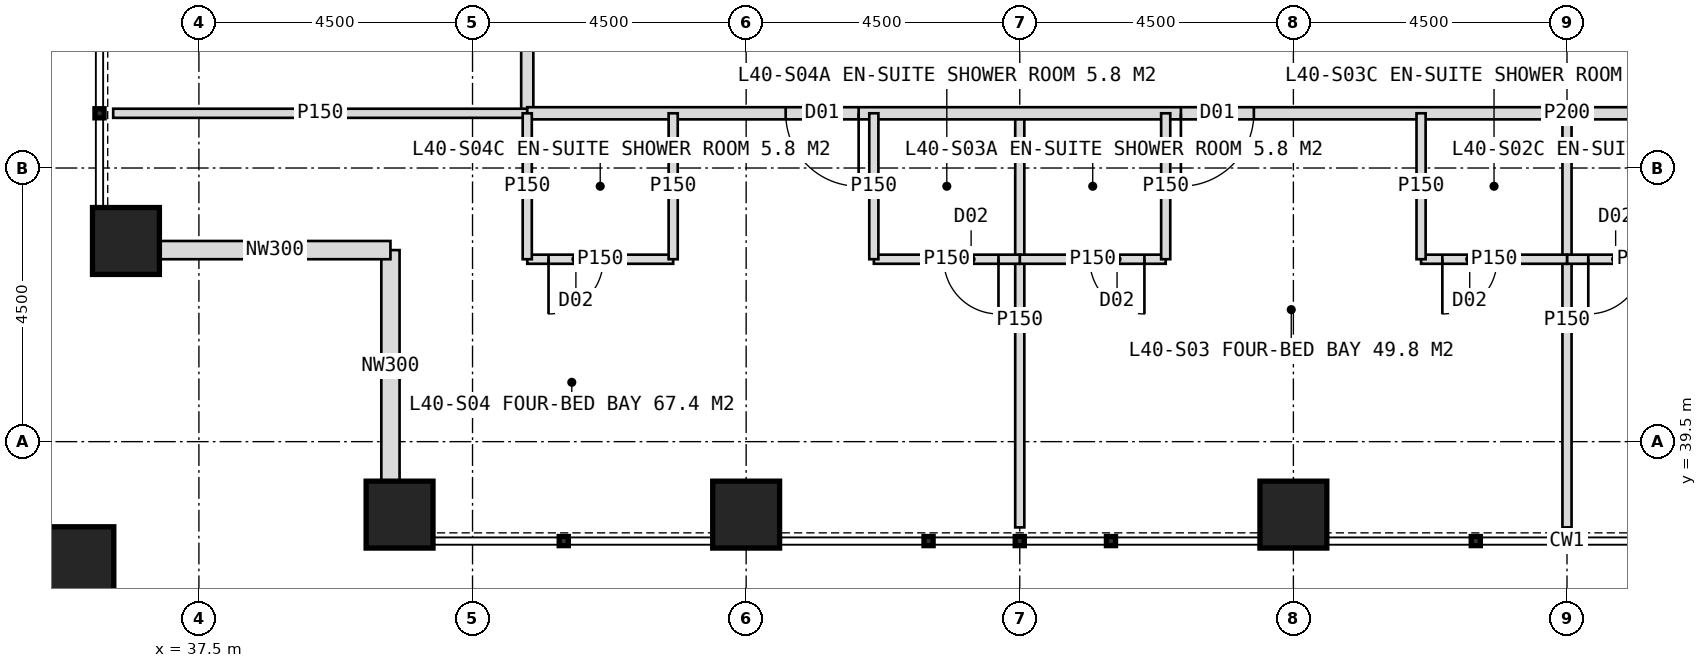
"""IFC4 building model, lengths in metres.
Left out: names, types, materials, properties, quantities, classifications, styles, units other than length and angle.
Written with IfcOpenShell. Run it as: python <this file> out.ifc"""

import sys

from ifc_helpers import new_model, si_unit, direction, frame, frame_2d, origin, origin_2d, place, context, subcontext, project, spatial, rectangle, hollow_rectangle, extrude, element, fill, save


model = new_model("IFC4")
c1 = context("Model", 3, precision=1e-05, world=origin(), true_north=direction((0.0, 1.0)))
c2 = subcontext(c1, "Body", "Model", "MODEL_VIEW")
j1 = project(units=[si_unit("LENGTHUNIT", "METRE"), si_unit("PLANEANGLEUNIT", "RADIAN")], contexts=[c1])
p1 = place(None, origin())
s1 = spatial("IfcSite", under=j1, at=p1, CompositionType="ELEMENT")
p2 = place(p1, origin())
s2 = spatial("IfcBuilding", under=s1, at=p2, CompositionType="ELEMENT")
p3 = place(p2, frame((0.0, 0.0, 168.0)))
s3 = spatial("IfcBuildingStorey", under=s2, at=p3, CompositionType="ELEMENT", Elevation=168.0)
for number, where, z_axis, x_axis in (
    (1, (40.8, 38.3, 0.0), (0.0, 0.0, 1.0), (1.0, 0.0, 0.0)),
    (2, (36.3, 42.8, 0.0), (0.0, 0.0, 1.0), (1.0, 0.0, 0.0)),
    (3, (46.5, 38.3, 0.0), (0.0, 0.0, 1.0), (1.0, 0.0, 0.0)),
    (4, (55.5, 38.3, 0.0), (0.0, 0.0, 1.0), (1.0, 0.0, 0.0)),
):
    element("IfcColumn", number, at=place(p3, frame(where, z_axis=z_axis, x_axis=x_axis)), inside=s3, PredefinedType="COLUMN", context=c2, shape_type="SweptSolid", body=[
        extrude(hollow_rectangle(XDim=1.1, YDim=1.1, WallThickness=0.1, at=origin_2d()), origin(), (0.0, 0.0, 1.0), 4.0),
    ])
p4 = place(p3, frame((35.4, 37.4, 0.0), z_axis=(0.0, 0.0, 1.0), x_axis=(1.0, 0.0, 0.0)))
e5 = element("IfcColumn", 5, at=p4, inside=s3, PredefinedType="COLUMN", context=c2, shape_type="SweptSolid", body=[
    extrude(hollow_rectangle(XDim=1.4, YDim=1.4, WallThickness=0.08, at=origin_2d()), origin(), (0.0, 0.0, 1.0), 2.0),
])
for number, where, z_axis, x_axis in (
    (6, (40.65, 38.85, 0.0), (0.0, 0.0, 1.0), (0.0, 1.0, 0.0)),
    (7, (40.65, 42.65, 0.0), (0.0, 0.0, 1.0), (-1.0, 0.0, 0.0)),
):
    element("IfcWall", number, at=place(p3, frame(where, z_axis=z_axis, x_axis=x_axis)), inside=s3, PredefinedType="ELEMENTEDWALL", context=c2, shape_type="SweptSolid", body=[
        extrude(rectangle(XDim=3.8, YDim=0.3, at=frame_2d((1.9, 0.0))), origin(), (0.0, 0.0, 1.0), 4.0),
    ])
p5 = place(p3, frame((42.9, 44.9, 0.0), z_axis=(0.0, 0.0, 1.0), x_axis=(0.0, 1.0, 0.0)))
e8 = element("IfcWall", 8, at=p5, inside=s3, PredefinedType="PARTITIONING", context=c2, shape_type="SweptSolid", body=[
    extrude(rectangle(XDim=34.2, YDim=0.2, at=frame_2d((17.1, 0.0))), origin(), (0.0, 0.0, 1.0), 3.75),
])
p6 = place(p5, frame((2.15, 0.0, 0.0)))
e9 = element("IfcOpeningElement", 9, at=p6, cuts=e8, PredefinedType="OPENING", context=c2, shape_type="SweptSolid", body=[
    extrude(rectangle(XDim=1.2, YDim=2.2, at=frame_2d((0.6, 1.1))), frame((0.0, 0.11, 0.0), z_axis=(0.0, -1.0, 0.0), x_axis=(1.0, 0.0, 0.0)), (0.0, 0.0, 1.0), 0.22),
])
p7 = place(p5, frame((9.25, 0.0, 0.0)))
e10 = element("IfcOpeningElement", 10, at=p7, cuts=e8, PredefinedType="OPENING", context=c2, shape_type="SweptSolid", body=[
    extrude(rectangle(XDim=1.2, YDim=2.2, at=frame_2d((0.6, 1.1))), frame((0.0, 0.11, 0.0), z_axis=(0.0, -1.0, 0.0), x_axis=(1.0, 0.0, 0.0)), (0.0, 0.0, 1.0), 0.22),
])
p8 = place(p5, frame((13.25, 0.0, 0.0)))
e11 = element("IfcOpeningElement", 11, at=p8, cuts=e8, PredefinedType="OPENING", context=c2, shape_type="SweptSolid", body=[
    extrude(rectangle(XDim=1.2, YDim=2.2, at=frame_2d((0.6, 1.1))), frame((0.0, 0.11, 0.0), z_axis=(0.0, -1.0, 0.0), x_axis=(1.0, 0.0, 0.0)), (0.0, 0.0, 1.0), 0.22),
])
p9 = place(p5, frame((19.75, 0.0, 0.0)))
e12 = element("IfcOpeningElement", 12, at=p9, cuts=e8, PredefinedType="OPENING", context=c2, shape_type="SweptSolid", body=[
    extrude(rectangle(XDim=1.2, YDim=2.2, at=frame_2d((0.6, 1.1))), frame((0.0, 0.11, 0.0), z_axis=(0.0, -1.0, 0.0), x_axis=(1.0, 0.0, 0.0)), (0.0, 0.0, 1.0), 0.22),
])
p10 = place(p5, frame((30.35, 0.0, 0.0)))
e13 = element("IfcOpeningElement", 13, at=p10, cuts=e8, PredefinedType="OPENING", context=c2, shape_type="SweptSolid", body=[
    extrude(rectangle(XDim=1.2, YDim=2.2, at=frame_2d((0.6, 1.1))), frame((0.0, 0.11, 0.0), z_axis=(0.0, -1.0, 0.0), x_axis=(1.0, 0.0, 0.0)), (0.0, 0.0, 1.0), 0.22),
])
p11 = place(p3, frame((42.9, 44.9, 0.0), z_axis=(0.0, 0.0, 1.0), x_axis=(-1.0, 0.0, 0.0)))
e14 = element("IfcWall", 14, at=p11, inside=s3, PredefinedType="PARTITIONING", context=c2, shape_type="SweptSolid", body=[
    extrude(rectangle(XDim=6.81, YDim=0.15, at=frame_2d((3.405, 0.0))), origin(), (0.0, 0.0, 1.0), 3.75),
])
p12 = place(p3, frame((60.0, 44.9, 0.0), z_axis=(0.0, 0.0, 1.0), x_axis=(0.0, -1.0, 0.0)))
e15 = element("IfcWall", 15, at=p12, inside=s3, PredefinedType="PARTITIONING", context=c2, shape_type="SweptSolid", body=[
    extrude(rectangle(XDim=6.81, YDim=0.15, at=frame_2d((3.405, 0.0))), origin(), (0.0, 0.0, 1.0), 2.95),
])
p13 = place(p3, frame((51.0, 44.9, 0.0), z_axis=(0.0, 0.0, 1.0), x_axis=(0.0, -1.0, 0.0)))
e16 = element("IfcWall", 16, at=p13, inside=s3, PredefinedType="PARTITIONING", context=c2, shape_type="SweptSolid", body=[
    extrude(rectangle(XDim=6.81, YDim=0.15, at=frame_2d((3.405, 0.0))), origin(), (0.0, 0.0, 1.0), 3.75),
])
p14 = place(p3, frame((77.1, 44.9, 0.0), z_axis=(0.0, 0.0, 1.0), x_axis=(-1.0, 0.0, 0.0)))
e17 = element("IfcWall", 17, at=p14, inside=s3, PredefinedType="PARTITIONING", context=c2, shape_type="SweptSolid", body=[
    extrude(rectangle(XDim=34.2, YDim=0.2, at=frame_2d((17.1, 0.0))), origin(), (0.0, 0.0, 1.0), 3.75),
])
p15 = place(p14, frame((4.25, 0.0, 0.0)))
e18 = element("IfcOpeningElement", 18, at=p15, cuts=e17, PredefinedType="OPENING", context=c2, shape_type="SweptSolid", body=[
    extrude(rectangle(XDim=1.2, YDim=2.2, at=frame_2d((0.6, 1.1))), frame((0.0, 0.11, 0.0), z_axis=(0.0, -1.0, 0.0), x_axis=(1.0, 0.0, 0.0)), (0.0, 0.0, 1.0), 0.22),
])
p16 = place(p14, frame((10.75, 0.0, 0.0)))
e19 = element("IfcOpeningElement", 19, at=p16, cuts=e17, PredefinedType="OPENING", context=c2, shape_type="SweptSolid", body=[
    extrude(rectangle(XDim=1.2, YDim=2.2, at=frame_2d((0.6, 1.1))), frame((0.0, 0.11, 0.0), z_axis=(0.0, -1.0, 0.0), x_axis=(1.0, 0.0, 0.0)), (0.0, 0.0, 1.0), 0.22),
])
p17 = place(p14, frame((22.25, 0.0, 0.0)))
e20 = element("IfcOpeningElement", 20, at=p17, cuts=e17, PredefinedType="OPENING", context=c2, shape_type="SweptSolid", body=[
    extrude(rectangle(XDim=1.2, YDim=2.2, at=frame_2d((0.6, 1.1))), frame((0.0, 0.11, 0.0), z_axis=(0.0, -1.0, 0.0), x_axis=(1.0, 0.0, 0.0)), (0.0, 0.0, 1.0), 0.22),
])
p18 = place(p14, frame((28.75, 0.0, 0.0)))
e21 = element("IfcOpeningElement", 21, at=p18, cuts=e17, PredefinedType="OPENING", context=c2, shape_type="SweptSolid", body=[
    extrude(rectangle(XDim=1.2, YDim=2.2, at=frame_2d((0.6, 1.1))), frame((0.0, 0.11, 0.0), z_axis=(0.0, -1.0, 0.0), x_axis=(1.0, 0.0, 0.0)), (0.0, 0.0, 1.0), 0.22),
])
p19 = place(p3, frame((62.4, 42.5, 0.0), z_axis=(0.0, 0.0, 1.0), x_axis=(-1.0, 0.0, 0.0)))
e22 = element("IfcWall", 22, at=p19, inside=s3, PredefinedType="PARTITIONING", context=c2, shape_type="SweptSolid", body=[
    extrude(rectangle(XDim=2.4, YDim=0.15, at=frame_2d((1.2, 0.0))), origin(), (0.0, 0.0, 1.0), 3.75),
])
p20 = place(p19, frame((1.15, 0.0, 0.0)))
e23 = element("IfcOpeningElement", 23, at=p20, cuts=e22, PredefinedType="OPENING", context=c2, shape_type="SweptSolid", body=[
    extrude(rectangle(XDim=0.9, YDim=2.1, at=frame_2d((0.45, 1.05))), frame((0.0, 0.085, 0.0), z_axis=(0.0, -1.0, 0.0), x_axis=(1.0, 0.0, 0.0)), (0.0, 0.0, 1.0), 0.17),
])
p21 = place(p3, frame((53.4, 42.5, 0.0), z_axis=(0.0, 0.0, 1.0), x_axis=(-1.0, 0.0, 0.0)))
e24 = element("IfcWall", 24, at=p21, inside=s3, PredefinedType="PARTITIONING", context=c2, shape_type="SweptSolid", body=[
    extrude(rectangle(XDim=2.4, YDim=0.15, at=frame_2d((1.2, 0.0))), origin(), (0.0, 0.0, 1.0), 3.75),
])
p22 = place(p21, frame((0.35, 0.0, 0.0)))
e25 = element("IfcOpeningElement", 25, at=p22, cuts=e24, PredefinedType="OPENING", context=c2, shape_type="SweptSolid", body=[
    extrude(rectangle(XDim=0.9, YDim=2.1, at=frame_2d((0.45, 1.05))), frame((0.0, 0.085, 0.0), z_axis=(0.0, -1.0, 0.0), x_axis=(1.0, 0.0, 0.0)), (0.0, 0.0, 1.0), 0.17),
])
p23 = place(p3, frame((53.4, 44.9, 0.0), z_axis=(0.0, 0.0, 1.0), x_axis=(0.0, -1.0, 0.0)))
e26 = element("IfcWall", 26, at=p23, inside=s3, PredefinedType="PARTITIONING", context=c2, shape_type="SweptSolid", body=[
    extrude(rectangle(XDim=2.4, YDim=0.15, at=frame_2d((1.2, 0.0))), origin(), (0.0, 0.0, 1.0), 3.75),
])
p24 = place(p3, frame((60.0, 42.5, 0.0), z_axis=(0.0, 0.0, 1.0), x_axis=(-1.0, 0.0, 0.0)))
e27 = element("IfcWall", 27, at=p24, inside=s3, PredefinedType="PARTITIONING", context=c2, shape_type="SweptSolid", body=[
    extrude(rectangle(XDim=2.4, YDim=0.15, at=frame_2d((1.2, 0.0))), origin(), (0.0, 0.0, 1.0), 3.75),
])
p25 = place(p24, frame((1.15, 0.0, 0.0)))
e28 = element("IfcOpeningElement", 28, at=p25, cuts=e27, PredefinedType="OPENING", context=c2, shape_type="SweptSolid", body=[
    extrude(rectangle(XDim=0.9, YDim=2.1, at=frame_2d((0.45, 1.05))), frame((0.0, 0.085, 0.0), z_axis=(0.0, -1.0, 0.0), x_axis=(1.0, 0.0, 0.0)), (0.0, 0.0, 1.0), 0.17),
])
p26 = place(p3, frame((57.6, 44.9, 0.0), z_axis=(0.0, 0.0, 1.0), x_axis=(0.0, -1.0, 0.0)))
e29 = element("IfcWall", 29, at=p26, inside=s3, PredefinedType="PARTITIONING", context=c2, shape_type="SweptSolid", body=[
    extrude(rectangle(XDim=2.4, YDim=0.15, at=frame_2d((1.2, 0.0))), origin(), (0.0, 0.0, 1.0), 3.75),
])
p27 = place(p3, frame((51.0, 42.5, 0.0), z_axis=(0.0, 0.0, 1.0), x_axis=(-1.0, 0.0, 0.0)))
e30 = element("IfcWall", 30, at=p27, inside=s3, PredefinedType="PARTITIONING", context=c2, shape_type="SweptSolid", body=[
    extrude(rectangle(XDim=2.4, YDim=0.15, at=frame_2d((1.2, 0.0))), origin(), (0.0, 0.0, 1.0), 3.75),
])
p28 = place(p27, frame((0.35, 0.0, 0.0)))
e31 = element("IfcOpeningElement", 31, at=p28, cuts=e30, PredefinedType="OPENING", context=c2, shape_type="SweptSolid", body=[
    extrude(rectangle(XDim=0.9, YDim=2.1, at=frame_2d((0.45, 1.05))), frame((0.0, 0.085, 0.0), z_axis=(0.0, -1.0, 0.0), x_axis=(1.0, 0.0, 0.0)), (0.0, 0.0, 1.0), 0.17),
])
p29 = place(p3, frame((48.6, 44.9, 0.0), z_axis=(0.0, 0.0, 1.0), x_axis=(0.0, -1.0, 0.0)))
e32 = element("IfcWall", 32, at=p29, inside=s3, PredefinedType="PARTITIONING", context=c2, shape_type="SweptSolid", body=[
    extrude(rectangle(XDim=2.4, YDim=0.15, at=frame_2d((1.2, 0.0))), origin(), (0.0, 0.0, 1.0), 3.75),
])
p30 = place(p3, frame((45.3, 42.5, 0.0), z_axis=(0.0, 0.0, 1.0), x_axis=(-1.0, 0.0, 0.0)))
e33 = element("IfcWall", 33, at=p30, inside=s3, PredefinedType="PARTITIONING", context=c2, shape_type="SweptSolid", body=[
    extrude(rectangle(XDim=2.4, YDim=0.15, at=frame_2d((1.2, 0.0))), origin(), (0.0, 0.0, 1.0), 3.75),
])
p31 = place(p30, frame((1.15, 0.0, 0.0)))
e34 = element("IfcOpeningElement", 34, at=p31, cuts=e33, PredefinedType="OPENING", context=c2, shape_type="SweptSolid", body=[
    extrude(rectangle(XDim=0.9, YDim=2.1, at=frame_2d((0.45, 1.05))), frame((0.0, 0.085, 0.0), z_axis=(0.0, -1.0, 0.0), x_axis=(1.0, 0.0, 0.0)), (0.0, 0.0, 1.0), 0.17),
])
for number, where, z_axis, x_axis in (
    (35, (45.3, 44.9, 0.0), (0.0, 0.0, 1.0), (0.0, -1.0, 0.0)),
    (36, (42.9, 44.9, 0.0), (0.0, 0.0, 1.0), (0.0, -1.0, 0.0)),
):
    element("IfcWall", number, at=place(p3, frame(where, z_axis=z_axis, x_axis=x_axis)), inside=s3, PredefinedType="PARTITIONING", context=c2, shape_type="SweptSolid", body=[
        extrude(rectangle(XDim=2.4, YDim=0.15, at=frame_2d((1.2, 0.0))), origin(), (0.0, 0.0, 1.0), 3.75),
    ])
p32 = place(p20, origin())
e37 = element("IfcDoor", 37, at=p32, inside=s3, OperationType="SINGLE_SWING_RIGHT", PredefinedType="DOOR", context=c2, shape_type="SweptSolid", body=[
    extrude(rectangle(XDim=0.9, YDim=2.1, at=frame_2d((0.45, 1.05))), frame((0.0, 0.025, 0.0), z_axis=(0.0, -1.0, 0.0), x_axis=(1.0, 0.0, 0.0)), (0.0, 0.0, 1.0), 0.05),
])
fill(e23, e37)
p33 = place(p17, origin())
e38 = element("IfcDoor", 38, at=p33, inside=s3, OperationType="SINGLE_SWING_RIGHT", PredefinedType="DOOR", context=c2, shape_type="SweptSolid", body=[
    extrude(rectangle(XDim=1.2, YDim=2.2, at=frame_2d((0.6, 1.1))), frame((0.0, 0.025, 0.0), z_axis=(0.0, -1.0, 0.0), x_axis=(1.0, 0.0, 0.0)), (0.0, 0.0, 1.0), 0.05),
])
fill(e20, e38)
p34 = place(p22, origin())
e39 = element("IfcDoor", 39, at=p34, inside=s3, OperationType="SINGLE_SWING_LEFT", PredefinedType="DOOR", context=c2, shape_type="SweptSolid", body=[
    extrude(rectangle(XDim=0.9, YDim=2.1, at=frame_2d((0.45, 1.05))), frame((0.0, 0.025, 0.0), z_axis=(0.0, -1.0, 0.0), x_axis=(1.0, 0.0, 0.0)), (0.0, 0.0, 1.0), 0.05),
])
fill(e25, e39)
p35 = place(p25, origin())
e40 = element("IfcDoor", 40, at=p35, inside=s3, OperationType="SINGLE_SWING_RIGHT", PredefinedType="DOOR", context=c2, shape_type="SweptSolid", body=[
    extrude(rectangle(XDim=0.9, YDim=2.1, at=frame_2d((0.45, 1.05))), frame((0.0, 0.025, 0.0), z_axis=(0.0, -1.0, 0.0), x_axis=(1.0, 0.0, 0.0)), (0.0, 0.0, 1.0), 0.05),
])
fill(e28, e40)
p36 = place(p18, origin())
e41 = element("IfcDoor", 41, at=p36, inside=s3, OperationType="SINGLE_SWING_LEFT", PredefinedType="DOOR", context=c2, shape_type="SweptSolid", body=[
    extrude(rectangle(XDim=1.2, YDim=2.2, at=frame_2d((0.6, 1.1))), frame((0.0, 0.025, 0.0), z_axis=(0.0, -1.0, 0.0), x_axis=(1.0, 0.0, 0.0)), (0.0, 0.0, 1.0), 0.05),
])
fill(e21, e41)
p37 = place(p28, origin())
e42 = element("IfcDoor", 42, at=p37, inside=s3, OperationType="SINGLE_SWING_LEFT", PredefinedType="DOOR", context=c2, shape_type="SweptSolid", body=[
    extrude(rectangle(XDim=0.9, YDim=2.1, at=frame_2d((0.45, 1.05))), frame((0.0, 0.025, 0.0), z_axis=(0.0, -1.0, 0.0), x_axis=(1.0, 0.0, 0.0)), (0.0, 0.0, 1.0), 0.05),
])
fill(e31, e42)
p38 = place(p31, origin())
e43 = element("IfcDoor", 43, at=p38, inside=s3, OperationType="SINGLE_SWING_RIGHT", PredefinedType="DOOR", context=c2, shape_type="SweptSolid", body=[
    extrude(rectangle(XDim=0.9, YDim=2.1, at=frame_2d((0.45, 1.05))), frame((0.0, 0.025, 0.0), z_axis=(0.0, -1.0, 0.0), x_axis=(1.0, 0.0, 0.0)), (0.0, 0.0, 1.0), 0.05),
])
fill(e34, e43)
save(model, sys.argv[1])
